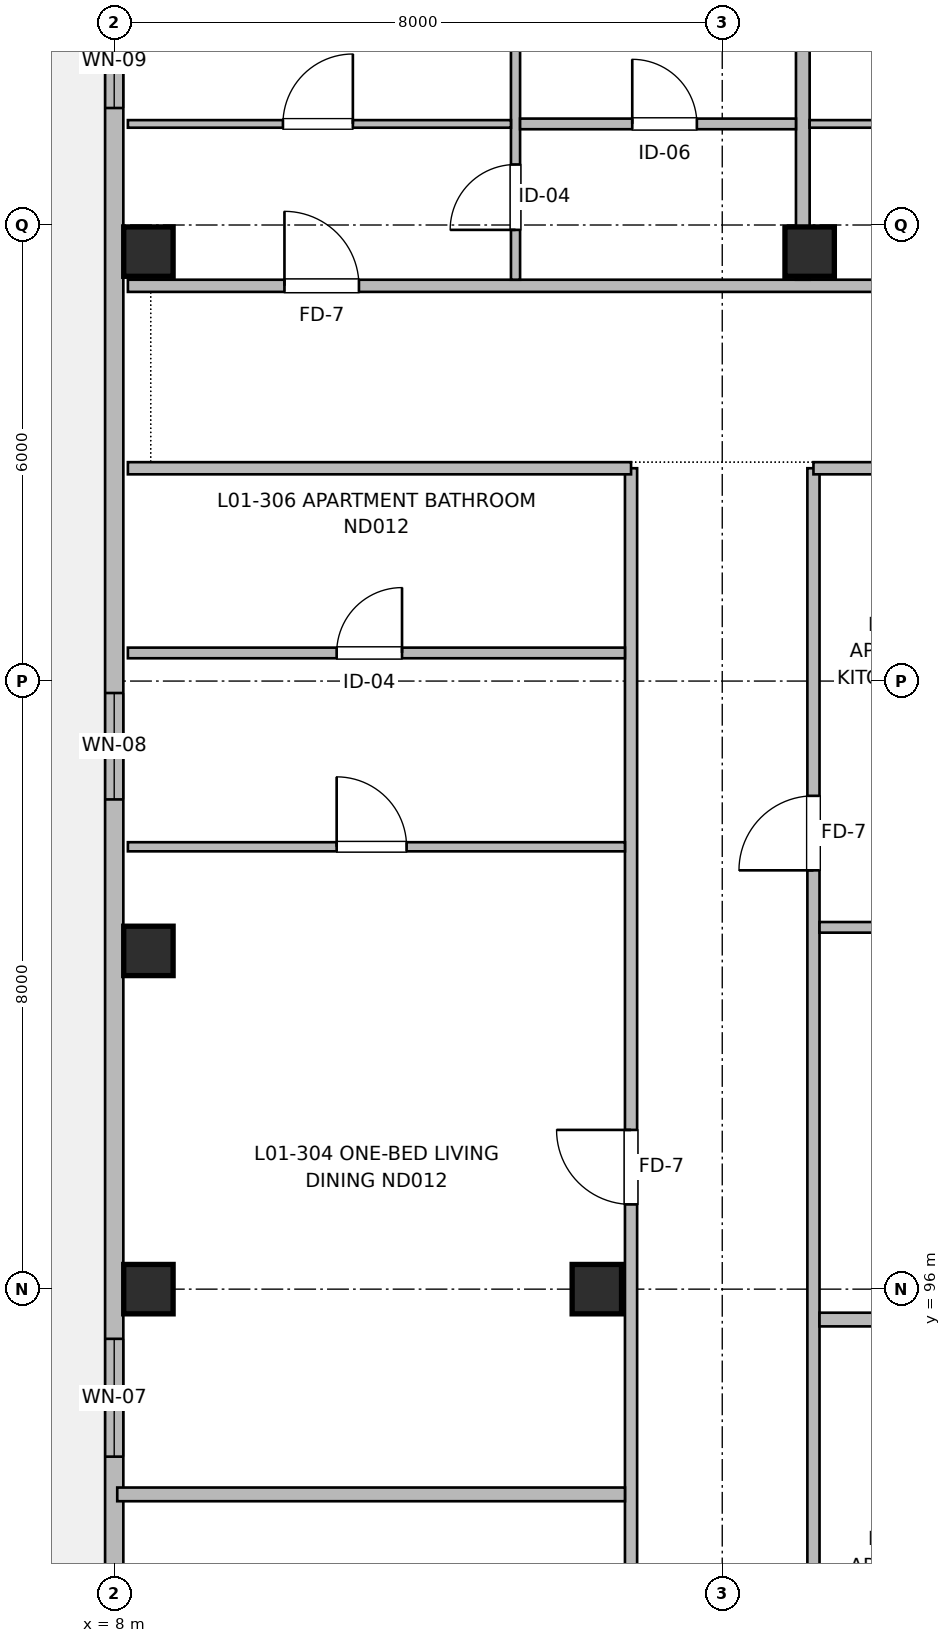
"""IFC4 building model, lengths in metres.
Left out: names, types, materials, properties, quantities, classifications, styles, units other than length and angle.
Written with IfcOpenShell. Run it as: python <this file> out.ifc"""

import sys

from ifc_helpers import new_model, si_unit, direction, frame, frame_2d, origin, origin_2d, place, context, subcontext, project, spatial, rectangle, extrude, element, fill, save


model = new_model("IFC4")
c1 = context("Model", 3, precision=1e-05, world=origin(), true_north=direction((0.0, 1.0)))
c2 = subcontext(c1, "Body", "Model", "MODEL_VIEW")
j1 = project(units=[si_unit("LENGTHUNIT", "METRE"), si_unit("PLANEANGLEUNIT", "RADIAN")], contexts=[c1])
p1 = place(None, origin())
s1 = spatial("IfcSite", under=j1, at=p1, CompositionType="ELEMENT")
p2 = place(p1, origin())
s2 = spatial("IfcBuilding", under=s1, at=p2, CompositionType="ELEMENT")
p3 = place(p2, frame((0.0, 0.0, 4.16)))
s3 = spatial("IfcBuildingStorey", under=s2, at=p3, CompositionType="ELEMENT", Elevation=4.16)
for number, where, z_axis, x_axis in (
    (1, (8.45, 96.0, 0.0), (0.0, 0.0, 1.0), (1.0, 0.0, 0.0)),
    (2, (8.45, 100.45, 0.0), (0.0, 0.0, 1.0), (1.0, 0.0, 0.0)),
    (3, (8.45, 109.65, 0.0), (0.0, 0.0, 1.0), (1.0, 0.0, 0.0)),
    (4, (14.35, 96.0, 0.0), (0.0, 0.0, 1.0), (1.0, 0.0, 0.0)),
    (5, (17.15, 109.65, 0.0), (0.0, 0.0, 1.0), (1.0, 0.0, 0.0)),
):
    element("IfcColumn", number, at=place(p3, frame(where, z_axis=z_axis, x_axis=x_axis)), inside=s3, PredefinedType="COLUMN", context=c2, shape_type="SweptSolid", body=[
        extrude(rectangle(XDim=0.65, YDim=0.65, at=origin_2d()), origin(), (0.0, 0.0, 1.0), 3.2),
    ])
p4 = place(p3, frame((8.0, 56.0, 0.0), z_axis=(0.0, 0.0, 1.0), x_axis=(0.0, 1.0, 0.0)))
e6 = element("IfcWall", 6, at=p4, inside=s3, PredefinedType="SOLIDWALL", context=c2, shape_type="SweptSolid", body=[
    extrude(rectangle(XDim=60.0, YDim=0.24, at=frame_2d((30.0, 0.0))), origin(), (0.0, 0.0, 1.0), 2.98),
])
p5 = place(p4, frame((4.886, 0.0, 0.0)))
e7 = element("IfcOpeningElement", 7, at=p5, cuts=e6, PredefinedType="OPENING", context=c2, shape_type="SweptSolid", body=[
    extrude(rectangle(XDim=1.2, YDim=2.2, at=frame_2d((0.6, 1.1))), frame((0.0, 0.13, 0.0), z_axis=(0.0, -1.0, 0.0), x_axis=(1.0, 0.0, 0.0)), (0.0, 0.0, 1.0), 0.26),
])
p6 = place(p4, frame((12.057, 0.0, 0.77)))
e8 = element("IfcOpeningElement", 8, at=p6, cuts=e6, PredefinedType="OPENING", context=c2, shape_type="SweptSolid", body=[
    extrude(rectangle(XDim=1.6, YDim=1.45, at=frame_2d((0.8, 0.725))), frame((0.0, 0.13, 0.0), z_axis=(0.0, -1.0, 0.0), x_axis=(1.0, 0.0, 0.0)), (0.0, 0.0, 1.0), 0.26),
])
p7 = place(p4, frame((18.929, 0.0, 0.72)))
e9 = element("IfcOpeningElement", 9, at=p7, cuts=e6, PredefinedType="OPENING", context=c2, shape_type="SweptSolid", body=[
    extrude(rectangle(XDim=2.4, YDim=1.5, at=frame_2d((1.2, 0.75))), frame((0.0, 0.13, 0.0), z_axis=(0.0, -1.0, 0.0), x_axis=(1.0, 0.0, 0.0)), (0.0, 0.0, 1.0), 0.26),
])
p8 = place(p4, frame((29.25, 0.0, 0.82)))
e10 = element("IfcOpeningElement", 10, at=p8, cuts=e6, PredefinedType="OPENING", context=c2, shape_type="SweptSolid", body=[
    extrude(rectangle(XDim=1.5, YDim=1.4, at=frame_2d((0.75, 0.7))), frame((0.0, 0.13, 0.0), z_axis=(0.0, -1.0, 0.0), x_axis=(1.0, 0.0, 0.0)), (0.0, 0.0, 1.0), 0.26),
])
p9 = place(p4, frame((37.796, 0.0, 0.82)))
e11 = element("IfcOpeningElement", 11, at=p9, cuts=e6, PredefinedType="OPENING", context=c2, shape_type="SweptSolid", body=[
    extrude(rectangle(XDim=1.55, YDim=1.4, at=frame_2d((0.775, 0.7))), frame((0.0, 0.13, 0.0), z_axis=(0.0, -1.0, 0.0), x_axis=(1.0, 0.0, 0.0)), (0.0, 0.0, 1.0), 0.26),
])
p10 = place(p4, frame((46.443, 0.0, 0.87)))
e12 = element("IfcOpeningElement", 12, at=p10, cuts=e6, PredefinedType="OPENING", context=c2, shape_type="SweptSolid", body=[
    extrude(rectangle(XDim=1.4, YDim=1.35, at=frame_2d((0.7, 0.675))), frame((0.0, 0.13, 0.0), z_axis=(0.0, -1.0, 0.0), x_axis=(1.0, 0.0, 0.0)), (0.0, 0.0, 1.0), 0.26),
])
p11 = place(p4, frame((55.539, 0.0, 0.87)))
e13 = element("IfcOpeningElement", 13, at=p11, cuts=e6, PredefinedType="OPENING", context=c2, shape_type="SweptSolid", body=[
    extrude(rectangle(XDim=1.25, YDim=1.35, at=frame_2d((0.625, 0.675))), frame((0.0, 0.13, 0.0), z_axis=(0.0, -1.0, 0.0), x_axis=(1.0, 0.0, 0.0)), (0.0, 0.0, 1.0), 0.26),
])
p12 = place(p3, frame((14.8, 56.18, 0.0), z_axis=(0.0, 0.0, 1.0), x_axis=(0.0, 1.0, 0.0)))
e14 = element("IfcWall", 14, at=p12, inside=s3, PredefinedType="PARTITIONING", context=c2, shape_type="SweptSolid", body=[
    extrude(rectangle(XDim=50.62, YDim=0.16, at=frame_2d((25.31, 0.0))), origin(), (0.0, 0.0, 1.0), 2.935),
])
p13 = place(p12, frame((12.82, 0.0, 0.0)))
e15 = element("IfcOpeningElement", 15, at=p13, cuts=e14, PredefinedType="OPENING", context=c2, shape_type="SweptSolid", body=[
    extrude(rectangle(XDim=1.1, YDim=2.15, at=frame_2d((0.55, 1.075))), frame((0.0, 0.09, 0.0), z_axis=(0.0, -1.0, 0.0), x_axis=(1.0, 0.0, 0.0)), (0.0, 0.0, 1.0), 0.18),
])
p14 = place(p12, frame((19.22, 0.0, 0.0)))
e16 = element("IfcOpeningElement", 16, at=p14, cuts=e14, PredefinedType="OPENING", context=c2, shape_type="SweptSolid", body=[
    extrude(rectangle(XDim=1.6, YDim=2.15, at=frame_2d((0.8, 1.075))), frame((0.0, 0.09, 0.0), z_axis=(0.0, -1.0, 0.0), x_axis=(1.0, 0.0, 0.0)), (0.0, 0.0, 1.0), 0.18),
])
p15 = place(p12, frame((1.8, 0.0, 0.0)))
e17 = element("IfcOpeningElement", 17, at=p15, cuts=e14, PredefinedType="OPENING", context=c2, shape_type="SweptSolid", body=[
    extrude(rectangle(XDim=0.96, YDim=2.15, at=frame_2d((0.48, 1.075))), frame((0.0, 0.09, 0.0), z_axis=(0.0, -1.0, 0.0), x_axis=(1.0, 0.0, 0.0)), (0.0, 0.0, 1.0), 0.18),
])
p16 = place(p12, frame((32.725, 0.0, 0.0)))
e18 = element("IfcOpeningElement", 18, at=p16, cuts=e14, PredefinedType="OPENING", context=c2, shape_type="SweptSolid", body=[
    extrude(rectangle(XDim=0.98, YDim=2.15, at=frame_2d((0.49, 1.075))), frame((0.0, 0.09, 0.0), z_axis=(0.0, -1.0, 0.0), x_axis=(1.0, 0.0, 0.0)), (0.0, 0.0, 1.0), 0.18),
])
p17 = place(p12, frame((40.935, 0.0, 0.0)))
e19 = element("IfcOpeningElement", 19, at=p17, cuts=e14, PredefinedType="OPENING", context=c2, shape_type="SweptSolid", body=[
    extrude(rectangle(XDim=0.98, YDim=2.15, at=frame_2d((0.49, 1.075))), frame((0.0, 0.09, 0.0), z_axis=(0.0, -1.0, 0.0), x_axis=(1.0, 0.0, 0.0)), (0.0, 0.0, 1.0), 0.18),
])
p18 = place(p3, frame((17.2, 56.18, 0.0), z_axis=(0.0, 0.0, 1.0), x_axis=(0.0, 1.0, 0.0)))
e20 = element("IfcWall", 20, at=p18, inside=s3, PredefinedType="PARTITIONING", context=c2, shape_type="SweptSolid", body=[
    extrude(rectangle(XDim=50.62, YDim=0.16, at=frame_2d((25.31, 0.0))), origin(), (0.0, 0.0, 1.0), 2.935),
])
p19 = place(p18, frame((6.29, 0.0, 0.0)))
e21 = element("IfcOpeningElement", 21, at=p19, cuts=e20, PredefinedType="OPENING", context=c2, shape_type="SweptSolid", body=[
    extrude(rectangle(XDim=0.98, YDim=2.15, at=frame_2d((0.49, 1.075))), frame((0.0, 0.09, 0.0), z_axis=(0.0, -1.0, 0.0), x_axis=(1.0, 0.0, 0.0)), (0.0, 0.0, 1.0), 0.18),
])
p20 = place(p18, frame((19.4, 0.0, 0.0)))
e22 = element("IfcOpeningElement", 22, at=p20, cuts=e20, PredefinedType="OPENING", context=c2, shape_type="SweptSolid", body=[
    extrude(rectangle(XDim=1.02, YDim=2.15, at=frame_2d((0.51, 1.075))), frame((0.0, 0.09, 0.0), z_axis=(0.0, -1.0, 0.0), x_axis=(1.0, 0.0, 0.0)), (0.0, 0.0, 1.0), 0.18),
])
p21 = place(p18, frame((33.08, 0.0, 0.0)))
e23 = element("IfcOpeningElement", 23, at=p21, cuts=e20, PredefinedType="OPENING", context=c2, shape_type="SweptSolid", body=[
    extrude(rectangle(XDim=0.98, YDim=2.15, at=frame_2d((0.49, 1.075))), frame((0.0, 0.09, 0.0), z_axis=(0.0, -1.0, 0.0), x_axis=(1.0, 0.0, 0.0)), (0.0, 0.0, 1.0), 0.18),
])
p22 = place(p18, frame((45.33, 0.0, 0.0)))
e24 = element("IfcOpeningElement", 24, at=p22, cuts=e20, PredefinedType="OPENING", context=c2, shape_type="SweptSolid", body=[
    extrude(rectangle(XDim=0.98, YDim=2.15, at=frame_2d((0.49, 1.075))), frame((0.0, 0.09, 0.0), z_axis=(0.0, -1.0, 0.0), x_axis=(1.0, 0.0, 0.0)), (0.0, 0.0, 1.0), 0.18),
])
p23 = place(p3, frame((8.18, 106.8, 0.0), z_axis=(0.0, 0.0, 1.0), x_axis=(1.0, 0.0, 0.0)))
e25 = element("IfcWall", 25, at=p23, inside=s3, PredefinedType="PARTITIONING", context=c2, shape_type="SweptSolid", body=[
    extrude(rectangle(XDim=6.62, YDim=0.16, at=frame_2d((3.31, 0.0))), origin(), (0.0, 0.0, 1.0), 2.935),
])
p24 = place(p3, frame((17.2, 106.8, 0.0), z_axis=(0.0, 0.0, 1.0), x_axis=(1.0, 0.0, 0.0)))
e26 = element("IfcWall", 26, at=p24, inside=s3, PredefinedType="PARTITIONING", context=c2, shape_type="SweptSolid", body=[
    extrude(rectangle(XDim=17.62, YDim=0.16, at=frame_2d((8.81, 0.0))), origin(), (0.0, 0.0, 1.0), 2.935),
])
p25 = place(p24, frame((13.075, 0.0, 0.0)))
e27 = element("IfcOpeningElement", 27, at=p25, cuts=e26, PredefinedType="OPENING", context=c2, shape_type="SweptSolid", body=[
    extrude(rectangle(XDim=1.05, YDim=2.15, at=frame_2d((0.525, 1.075))), frame((0.0, 0.09, 0.0), z_axis=(0.0, -1.0, 0.0), x_axis=(1.0, 0.0, 0.0)), (0.0, 0.0, 1.0), 0.18),
])
p26 = place(p3, frame((8.18, 109.2, 0.0), z_axis=(0.0, 0.0, 1.0), x_axis=(1.0, 0.0, 0.0)))
e28 = element("IfcWall", 28, at=p26, inside=s3, PredefinedType="PARTITIONING", context=c2, shape_type="SweptSolid", body=[
    extrude(rectangle(XDim=26.64, YDim=0.16, at=frame_2d((13.32, 0.0))), origin(), (0.0, 0.0, 1.0), 2.935),
])
p27 = place(p26, frame((2.06, 0.0, 0.0)))
e29 = element("IfcOpeningElement", 29, at=p27, cuts=e28, PredefinedType="OPENING", context=c2, shape_type="SweptSolid", body=[
    extrude(rectangle(XDim=0.98, YDim=2.15, at=frame_2d((0.49, 1.075))), frame((0.0, 0.09, 0.0), z_axis=(0.0, -1.0, 0.0), x_axis=(1.0, 0.0, 0.0)), (0.0, 0.0, 1.0), 0.18),
])
p28 = place(p26, frame((11.005, 0.0, 0.0)))
e30 = element("IfcOpeningElement", 30, at=p28, cuts=e28, PredefinedType="OPENING", context=c2, shape_type="SweptSolid", body=[
    extrude(rectangle(XDim=0.98, YDim=2.15, at=frame_2d((0.49, 1.075))), frame((0.0, 0.09, 0.0), z_axis=(0.0, -1.0, 0.0), x_axis=(1.0, 0.0, 0.0)), (0.0, 0.0, 1.0), 0.18),
])
p29 = place(p26, frame((19.91, 0.0, 0.0)))
e31 = element("IfcOpeningElement", 31, at=p29, cuts=e28, PredefinedType="OPENING", context=c2, shape_type="SweptSolid", body=[
    extrude(rectangle(XDim=0.98, YDim=2.15, at=frame_2d((0.49, 1.075))), frame((0.0, 0.09, 0.0), z_axis=(0.0, -1.0, 0.0), x_axis=(1.0, 0.0, 0.0)), (0.0, 0.0, 1.0), 0.18),
])
p30 = place(p3, frame((17.28, 95.6, 0.0), z_axis=(0.0, 0.0, 1.0), x_axis=(1.0, 0.0, 0.0)))
e32 = element("IfcWall", 32, at=p30, inside=s3, PredefinedType="PARTITIONING", context=c2, shape_type="SweptSolid", body=[
    extrude(rectangle(XDim=10.627, YDim=0.18, at=frame_2d((5.314, 0.0))), origin(), (0.0, 0.0, 1.0), 2.935),
])
p31 = place(p3, frame((17.28, 100.76, 0.0), z_axis=(0.0, 0.0, 1.0), x_axis=(1.0, 0.0, 0.0)))
e33 = element("IfcWall", 33, at=p31, inside=s3, PredefinedType="PARTITIONING", context=c2, shape_type="SweptSolid", body=[
    extrude(rectangle(XDim=2.32, YDim=0.14, at=frame_2d((1.16, 0.0))), origin(), (0.0, 0.0, 1.0), 2.935),
])
p32 = place(p3, frame((17.06, 109.28, 0.0), z_axis=(0.0, 0.0, 1.0), x_axis=(0.0, 1.0, 0.0)))
e34 = element("IfcWall", 34, at=p32, inside=s3, PredefinedType="PARTITIONING", context=c2, shape_type="SweptSolid", body=[
    extrude(rectangle(XDim=6.6, YDim=0.18, at=frame_2d((3.3, 0.0))), origin(), (0.0, 0.0, 1.0), 2.68),
])
p33 = place(p3, frame((13.28, 109.28, 0.0), z_axis=(0.0, 0.0, 1.0), x_axis=(0.0, 1.0, 0.0)))
e35 = element("IfcWall", 35, at=p33, inside=s3, PredefinedType="PARTITIONING", context=c2, shape_type="SweptSolid", body=[
    extrude(rectangle(XDim=6.6, YDim=0.12, at=frame_2d((3.3, 0.0))), origin(), (0.0, 0.0, 1.0), 2.935),
])
p34 = place(p33, frame((0.656, 0.0, 0.0)))
e36 = element("IfcOpeningElement", 36, at=p34, cuts=e35, PredefinedType="OPENING", context=c2, shape_type="SweptSolid", body=[
    extrude(rectangle(XDim=0.86, YDim=2.1, at=frame_2d((0.43, 1.05))), frame((0.0, 0.07, 0.0), z_axis=(0.0, -1.0, 0.0), x_axis=(1.0, 0.0, 0.0)), (0.0, 0.0, 1.0), 0.14),
])
p35 = place(p33, frame((4.097, 0.0, 0.0)))
e37 = element("IfcOpeningElement", 37, at=p35, cuts=e35, PredefinedType="OPENING", context=c2, shape_type="SweptSolid", body=[
    extrude(rectangle(XDim=0.9, YDim=2.1, at=frame_2d((0.45, 1.05))), frame((0.0, 0.07, 0.0), z_axis=(0.0, -1.0, 0.0), x_axis=(1.0, 0.0, 0.0)), (0.0, 0.0, 1.0), 0.14),
])
p36 = place(p3, frame((13.34, 111.33, 0.0), z_axis=(0.0, 0.0, 1.0), x_axis=(1.0, 0.0, 0.0)))
e38 = element("IfcWall", 38, at=p36, inside=s3, PredefinedType="PARTITIONING", context=c2, shape_type="SweptSolid", body=[
    extrude(rectangle(XDim=3.63, YDim=0.14, at=frame_2d((1.815, 0.0))), origin(), (0.0, 0.0, 1.0), 2.935),
])
p37 = place(p36, frame((1.476, 0.0, 0.0)))
e39 = element("IfcOpeningElement", 39, at=p37, cuts=e38, PredefinedType="OPENING", context=c2, shape_type="SweptSolid", body=[
    extrude(rectangle(XDim=0.85, YDim=2.05, at=frame_2d((0.425, 1.025))), frame((0.0, 0.08, 0.0), z_axis=(0.0, -1.0, 0.0), x_axis=(1.0, 0.0, 0.0)), (0.0, 0.0, 1.0), 0.16),
])
p38 = place(p3, frame((8.18, 111.33, 0.0), z_axis=(0.0, 0.0, 1.0), x_axis=(1.0, 0.0, 0.0)))
e40 = element("IfcWall", 40, at=p38, inside=s3, PredefinedType="PARTITIONING", context=c2, shape_type="SweptSolid", body=[
    extrude(rectangle(XDim=5.04, YDim=0.1, at=frame_2d((2.52, 0.0))), origin(), (0.0, 0.0, 1.0), 2.935),
])
p39 = place(p38, frame((2.04, 0.0, 0.0)))
e41 = element("IfcOpeningElement", 41, at=p39, cuts=e40, PredefinedType="OPENING", context=c2, shape_type="SweptSolid", body=[
    extrude(rectangle(XDim=0.92, YDim=2.1, at=frame_2d((0.46, 1.05))), frame((0.0, 0.06, 0.0), z_axis=(0.0, -1.0, 0.0), x_axis=(1.0, 0.0, 0.0)), (0.0, 0.0, 1.0), 0.12),
])
p40 = place(p3, frame((17.15, 111.33, 0.0), z_axis=(0.0, 0.0, 1.0), x_axis=(1.0, 0.0, 0.0)))
e42 = element("IfcWall", 42, at=p40, inside=s3, PredefinedType="PARTITIONING", context=c2, shape_type="SweptSolid", body=[
    extrude(rectangle(XDim=4.99, YDim=0.1, at=frame_2d((2.495, 0.0))), origin(), (0.0, 0.0, 1.0), 2.935),
])
p41 = place(p40, frame((2.02, 0.0, 0.0)))
e43 = element("IfcOpeningElement", 43, at=p41, cuts=e42, PredefinedType="OPENING", context=c2, shape_type="SweptSolid", body=[
    extrude(rectangle(XDim=0.92, YDim=2.1, at=frame_2d((0.46, 1.05))), frame((0.0, 0.06, 0.0), z_axis=(0.0, -1.0, 0.0), x_axis=(1.0, 0.0, 0.0)), (0.0, 0.0, 1.0), 0.12),
])
p42 = place(p3, frame((8.04, 93.3, 0.0), z_axis=(0.0, 0.0, 1.0), x_axis=(1.0, 0.0, 0.0)))
e44 = element("IfcWall", 44, at=p42, inside=s3, PredefinedType="PARTITIONING", context=c2, shape_type="SweptSolid", body=[
    extrude(rectangle(XDim=6.68, YDim=0.18, at=frame_2d((3.34, 0.0))), origin(), (0.0, 0.0, 1.0), 2.935),
])
p43 = place(p3, frame((8.18, 101.82, 0.0), z_axis=(0.0, 0.0, 1.0), x_axis=(1.0, 0.0, 0.0)))
e45 = element("IfcWall", 45, at=p43, inside=s3, PredefinedType="PARTITIONING", context=c2, shape_type="SweptSolid", body=[
    extrude(rectangle(XDim=6.54, YDim=0.12, at=frame_2d((3.27, 0.0))), origin(), (0.0, 0.0, 1.0), 2.935),
])
p44 = place(p43, frame((2.747, 0.0, 0.0)))
e46 = element("IfcOpeningElement", 46, at=p44, cuts=e45, PredefinedType="OPENING", context=c2, shape_type="SweptSolid", body=[
    extrude(rectangle(XDim=0.92, YDim=2.1, at=frame_2d((0.46, 1.05))), frame((0.0, 0.07, 0.0), z_axis=(0.0, -1.0, 0.0), x_axis=(1.0, 0.0, 0.0)), (0.0, 0.0, 1.0), 0.14),
])
p45 = place(p3, frame((8.18, 104.37, 0.0), z_axis=(0.0, 0.0, 1.0), x_axis=(1.0, 0.0, 0.0)))
e47 = element("IfcWall", 47, at=p45, inside=s3, PredefinedType="PARTITIONING", context=c2, shape_type="SweptSolid", body=[
    extrude(rectangle(XDim=6.54, YDim=0.14, at=frame_2d((3.27, 0.0))), origin(), (0.0, 0.0, 1.0), 2.935),
])
p46 = place(p45, frame((2.747, 0.0, 0.0)))
e48 = element("IfcOpeningElement", 48, at=p46, cuts=e47, PredefinedType="OPENING", context=c2, shape_type="SweptSolid", body=[
    extrude(rectangle(XDim=0.86, YDim=2.1, at=frame_2d((0.43, 1.05))), frame((0.0, 0.08, 0.0), z_axis=(0.0, -1.0, 0.0), x_axis=(1.0, 0.0, 0.0)), (0.0, 0.0, 1.0), 0.16),
])
p47 = place(p9, origin())
e49 = element("IfcWindow", 49, at=p47, inside=s3, PartitioningType="SINGLE_PANEL", PredefinedType="WINDOW", context=c2, shape_type="SweptSolid", body=[
    extrude(rectangle(XDim=1.55, YDim=1.4, at=frame_2d((0.775, 0.7))), frame((0.0, 0.03, 0.0), z_axis=(0.0, -1.0, 0.0), x_axis=(1.0, 0.0, 0.0)), (0.0, 0.0, 1.0), 0.06),
])
fill(e11, e49)
p48 = place(p10, origin())
e50 = element("IfcWindow", 50, at=p48, inside=s3, PartitioningType="SINGLE_PANEL", PredefinedType="WINDOW", context=c2, shape_type="SweptSolid", body=[
    extrude(rectangle(XDim=1.4, YDim=1.35, at=frame_2d((0.7, 0.675))), frame((0.0, 0.03, 0.0), z_axis=(0.0, -1.0, 0.0), x_axis=(1.0, 0.0, 0.0)), (0.0, 0.0, 1.0), 0.06),
])
fill(e12, e50)
p49 = place(p11, origin())
e51 = element("IfcWindow", 51, at=p49, inside=s3, PartitioningType="SINGLE_PANEL", PredefinedType="WINDOW", context=c2, shape_type="SweptSolid", body=[
    extrude(rectangle(XDim=1.25, YDim=1.35, at=frame_2d((0.625, 0.675))), frame((0.0, 0.03, 0.0), z_axis=(0.0, -1.0, 0.0), x_axis=(1.0, 0.0, 0.0)), (0.0, 0.0, 1.0), 0.06),
])
fill(e13, e51)
p50 = place(p22, origin())
e52 = element("IfcDoor", 52, at=p50, inside=s3, OperationType="SINGLE_SWING_LEFT", PredefinedType="DOOR", context=c2, shape_type="SweptSolid", body=[
    extrude(rectangle(XDim=0.98, YDim=2.15, at=frame_2d((0.49, 1.075))), frame((0.0, 0.025, 0.0), z_axis=(0.0, -1.0, 0.0), x_axis=(1.0, 0.0, 0.0)), (0.0, 0.0, 1.0), 0.05),
])
fill(e24, e52)
p51 = place(p27, origin())
e53 = element("IfcDoor", 53, at=p51, inside=s3, OperationType="SINGLE_SWING_LEFT", PredefinedType="DOOR", context=c2, shape_type="SweptSolid", body=[
    extrude(rectangle(XDim=0.98, YDim=2.15, at=frame_2d((0.49, 1.075))), frame((0.0, 0.025, 0.0), z_axis=(0.0, -1.0, 0.0), x_axis=(1.0, 0.0, 0.0)), (0.0, 0.0, 1.0), 0.05),
])
fill(e29, e53)
p52 = place(p39, origin())
e54 = element("IfcDoor", 54, at=p52, inside=s3, OperationType="SINGLE_SWING_RIGHT", PredefinedType="DOOR", context=c2, shape_type="SweptSolid", body=[
    extrude(rectangle(XDim=0.92, YDim=2.1, at=frame_2d((0.46, 1.05))), frame((0.0, 0.025, 0.0), z_axis=(0.0, -1.0, 0.0), x_axis=(1.0, 0.0, 0.0)), (0.0, 0.0, 1.0), 0.05),
])
fill(e41, e54)
p53 = place(p34, origin())
e55 = element("IfcDoor", 55, at=p53, inside=s3, OperationType="SINGLE_SWING_LEFT", PredefinedType="DOOR", context=c2, shape_type="SweptSolid", body=[
    extrude(rectangle(XDim=0.86, YDim=2.1, at=frame_2d((0.43, 1.05))), frame((0.0, 0.025, 0.0), z_axis=(0.0, -1.0, 0.0), x_axis=(1.0, 0.0, 0.0)), (0.0, 0.0, 1.0), 0.05),
])
fill(e36, e55)
p54 = place(p37, origin())
e56 = element("IfcDoor", 56, at=p54, inside=s3, OperationType="SINGLE_SWING_LEFT", PredefinedType="DOOR", context=c2, shape_type="SweptSolid", body=[
    extrude(rectangle(XDim=0.85, YDim=2.05, at=frame_2d((0.425, 1.025))), frame((0.0, 0.025, 0.0), z_axis=(0.0, -1.0, 0.0), x_axis=(1.0, 0.0, 0.0)), (0.0, 0.0, 1.0), 0.05),
])
fill(e39, e56)
p55 = place(p46, origin())
e57 = element("IfcDoor", 57, at=p55, inside=s3, OperationType="SINGLE_SWING_RIGHT", PredefinedType="DOOR", context=c2, shape_type="SweptSolid", body=[
    extrude(rectangle(XDim=0.86, YDim=2.1, at=frame_2d((0.43, 1.05))), frame((0.0, 0.025, 0.0), z_axis=(0.0, -1.0, 0.0), x_axis=(1.0, 0.0, 0.0)), (0.0, 0.0, 1.0), 0.05),
])
fill(e48, e57)
p56 = place(p44, origin())
e58 = element("IfcDoor", 58, at=p56, inside=s3, OperationType="SINGLE_SWING_LEFT", PredefinedType="DOOR", context=c2, shape_type="SweptSolid", body=[
    extrude(rectangle(XDim=0.92, YDim=2.1, at=frame_2d((0.46, 1.05))), frame((0.0, 0.025, 0.0), z_axis=(0.0, -1.0, 0.0), x_axis=(1.0, 0.0, 0.0)), (0.0, 0.0, 1.0), 0.05),
])
fill(e46, e58)
p57 = place(p17, origin())
e59 = element("IfcDoor", 59, at=p57, inside=s3, OperationType="SINGLE_SWING_RIGHT", PredefinedType="DOOR", context=c2, shape_type="SweptSolid", body=[
    extrude(rectangle(XDim=0.98, YDim=2.15, at=frame_2d((0.49, 1.075))), frame((0.0, 0.025, 0.0), z_axis=(0.0, -1.0, 0.0), x_axis=(1.0, 0.0, 0.0)), (0.0, 0.0, 1.0), 0.05),
])
fill(e19, e59)
save(model, sys.argv[1])
